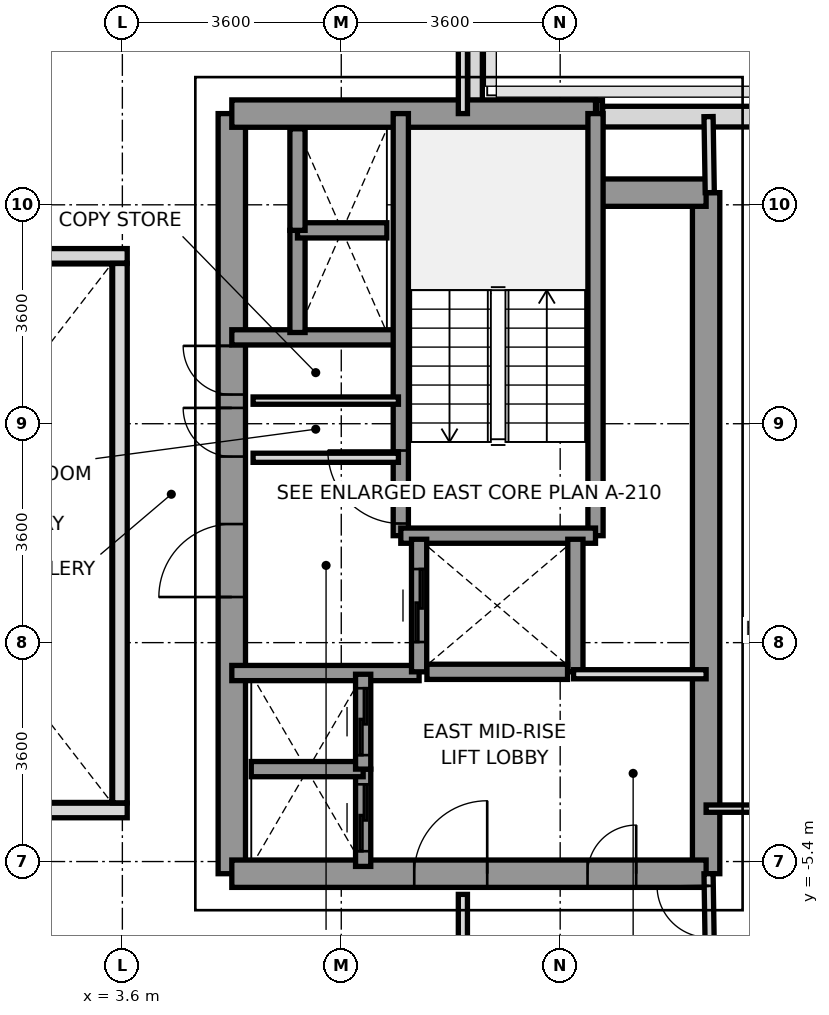
"""IFC4 building model, lengths in metres.
Left out: names, types, materials, properties, quantities, classifications, styles, units other than length and angle.
Written with IfcOpenShell. Run it as: python <this file> out.ifc"""

import sys

from ifc_helpers import new_model, si_unit, direction, frame, frame_2d, origin, place, context, subcontext, project, spatial, rectangle, extrude, source, transform, mapped, element, fill, save


model = new_model("IFC4")
c1 = context("Model", 3, precision=1e-05, world=origin(), true_north=direction((0.0, 1.0)))
c2 = subcontext(c1, "Body", "Model", "MODEL_VIEW")
j1 = project(units=[si_unit("LENGTHUNIT", "METRE"), si_unit("PLANEANGLEUNIT", "RADIAN")], contexts=[c1])
p1 = place(None, origin())
s1 = spatial("IfcSite", under=j1, at=p1, CompositionType="ELEMENT")
p2 = place(p1, origin())
s2 = spatial("IfcBuilding", under=s1, at=p2, CompositionType="ELEMENT")
p3 = place(p2, frame((0.0, 0.0, 127.8)))
s3 = spatial("IfcBuildingStorey", under=s2, at=p3, CompositionType="ELEMENT", Elevation=127.8)
p4 = place(p3, frame((11.498, 6.85, 0.0), z_axis=(0.0, 0.0, 1.0), x_axis=(1.0, 0.0, 0.0)))
e1 = element("IfcWall", 1, at=p4, inside=s3, PredefinedType="SOLIDWALL", context=c2, shape_type="SweptSolid", body=[
    extrude(rectangle(XDim=2.585, YDim=0.34, at=frame_2d((1.292, 0.0))), origin(), (0.0, 0.0, 1.0), 3.2),
])
p5 = place(p3, frame((9.4, 8.472, 0.0), z_axis=(0.0, 0.0, 1.0), x_axis=(0.0, -1.0, 0.0)))
e2 = element("IfcWall", 2, at=p5, inside=s3, PredefinedType="PARAPET", context=c2, shape_type="SweptSolid", body=[
    extrude(rectangle(XDim=1.519, YDim=0.24, at=frame_2d((0.76, 0.0))), origin(), (0.0, 0.0, 1.0), 1.15),
])
p6 = place(p3, frame((11.403, 7.0, 0.0), z_axis=(0.0, 0.0, 1.0), x_axis=(1.0, 0.0, 0.0)))
e3 = element("IfcWall", 3, at=p6, inside=s3, PredefinedType="PARAPET", context=c2, shape_type="SweptSolid", body=[
    extrude(rectangle(XDim=0.092, YDim=0.24, at=frame_2d((0.046, 0.0))), origin(), (0.0, 0.0, 1.0), 1.15),
])
p7 = place(p3, frame((13.2, -5.6, 0.0), z_axis=(0.0, 0.0, 1.0), x_axis=(0.0, 1.0, 0.0)))
e4 = element("IfcWall", 4, at=p7, inside=s3, PredefinedType="SHEAR", context=c2, shape_type="SweptSolid", body=[
    extrude(rectangle(XDim=11.2, YDim=0.45, at=frame_2d((5.6, 0.0))), origin(), (0.0, 0.0, 1.0), 3.2),
])
p8 = place(p3, frame((5.4, -5.6, 0.0), z_axis=(0.0, 0.0, 1.0), x_axis=(0.0, 1.0, 0.0)))
e5 = element("IfcWall", 5, at=p8, inside=s3, PredefinedType="SHEAR", context=c2, shape_type="SweptSolid", body=[
    extrude(rectangle(XDim=12.5, YDim=0.45, at=frame_2d((6.25, 0.0))), origin(), (0.0, 0.0, 1.0), 3.2),
])
p9 = place(p8, frame((4.55, 0.0, 0.0)))
e6 = element("IfcOpeningElement", 6, at=p9, cuts=e5, PredefinedType="OPENING", context=c2, shape_type="SweptSolid", body=[
    extrude(rectangle(XDim=1.2, YDim=2.2, at=frame_2d((0.6, 1.1))), frame((0.0, 0.235, 0.0), z_axis=(0.0, -1.0, 0.0), x_axis=(1.0, 0.0, 0.0)), (0.0, 0.0, 1.0), 0.47),
])
p10 = place(p8, frame((6.86, 0.0, 0.0)))
e7 = element("IfcOpeningElement", 7, at=p10, cuts=e5, PredefinedType="OPENING", context=c2, shape_type="SweptSolid", body=[
    extrude(rectangle(XDim=0.8, YDim=2.1, at=frame_2d((0.4, 1.05))), frame((0.0, 0.235, 0.0), z_axis=(0.0, -1.0, 0.0), x_axis=(1.0, 0.0, 0.0)), (0.0, 0.0, 1.0), 0.47),
])
p11 = place(p8, frame((7.88, 0.0, 0.0)))
e8 = element("IfcOpeningElement", 8, at=p11, cuts=e5, PredefinedType="OPENING", context=c2, shape_type="SweptSolid", body=[
    extrude(rectangle(XDim=0.8, YDim=2.1, at=frame_2d((0.4, 1.05))), frame((0.0, 0.235, 0.0), z_axis=(0.0, -1.0, 0.0), x_axis=(1.0, 0.0, 0.0)), (0.0, 0.0, 1.0), 0.47),
])
p12 = place(p3, frame((5.4, 6.9, 0.0), z_axis=(0.0, 0.0, 1.0), x_axis=(1.0, 0.0, 0.0)))
e9 = element("IfcWall", 9, at=p12, inside=s3, PredefinedType="SHEAR", context=c2, shape_type="SweptSolid", body=[
    extrude(rectangle(XDim=5.981, YDim=0.45, at=frame_2d((2.991, 0.0))), origin(), (0.0, 0.0, 1.0), 3.2),
])
p13 = place(p3, frame((11.381, 5.6, 0.0), z_axis=(0.0, 0.0, 1.0), x_axis=(1.0, 0.0, 0.0)))
e10 = element("IfcWall", 10, at=p13, inside=s3, PredefinedType="SHEAR", context=c2, shape_type="SweptSolid", body=[
    extrude(rectangle(XDim=1.819, YDim=0.45, at=frame_2d((0.909, 0.0))), origin(), (0.0, 0.0, 1.0), 3.2),
])
p14 = place(p3, frame((5.4, -5.6, 0.0), z_axis=(0.0, 0.0, 1.0), x_axis=(1.0, 0.0, 0.0)))
e11 = element("IfcWall", 11, at=p14, inside=s3, PredefinedType="SHEAR", context=c2, shape_type="SweptSolid", body=[
    extrude(rectangle(XDim=7.8, YDim=0.45, at=frame_2d((3.9, 0.0))), origin(), (0.0, 0.0, 1.0), 3.2),
])
p15 = place(p14, frame((3.0, 0.0, 0.0)))
e12 = element("IfcOpeningElement", 12, at=p15, cuts=e11, PredefinedType="OPENING", context=c2, shape_type="SweptSolid", body=[
    extrude(rectangle(XDim=1.2, YDim=2.2, at=frame_2d((0.6, 1.1))), frame((0.0, 0.235, 0.0), z_axis=(0.0, -1.0, 0.0), x_axis=(1.0, 0.0, 0.0)), (0.0, 0.0, 1.0), 0.47),
])
p16 = place(p14, frame((5.85, 0.0, 0.0)))
e13 = element("IfcOpeningElement", 13, at=p16, cuts=e11, PredefinedType="OPENING", context=c2, shape_type="SweptSolid", body=[
    extrude(rectangle(XDim=0.8, YDim=2.1, at=frame_2d((0.4, 1.05))), frame((0.0, 0.235, 0.0), z_axis=(0.0, -1.0, 0.0), x_axis=(1.0, 0.0, 0.0)), (0.0, 0.0, 1.0), 0.47),
])
p17 = place(p3, frame((5.4, 3.22, 0.0), z_axis=(0.0, 0.0, 1.0), x_axis=(1.0, 0.0, 0.0)))
e14 = element("IfcWall", 14, at=p17, inside=s3, PredefinedType="SOLIDWALL", context=c2, shape_type="SweptSolid", body=[
    extrude(rectangle(XDim=2.78, YDim=0.25, at=frame_2d((1.39, 0.0))), origin(), (0.0, 0.0, 1.0), 3.2),
])
p18 = place(p3, frame((5.4, -2.3, 0.0), z_axis=(0.0, 0.0, 1.0), x_axis=(1.0, 0.0, 0.0)))
e15 = element("IfcWall", 15, at=p18, inside=s3, PredefinedType="SOLIDWALL", context=c2, shape_type="SweptSolid", body=[
    extrude(rectangle(XDim=3.08, YDim=0.25, at=frame_2d((1.54, 0.0))), origin(), (0.0, 0.0, 1.0), 3.2),
])
p19 = place(p3, frame((8.179, -0.041, 0.0), z_axis=(0.0, 0.0, 1.0), x_axis=(0.0, 1.0, 0.0)))
e16 = element("IfcWall", 16, at=p19, inside=s3, PredefinedType="SOLIDWALL", context=c2, shape_type="SweptSolid", body=[
    extrude(rectangle(XDim=6.941, YDim=0.25, at=frame_2d((3.47, 0.0))), origin(), (0.0, 0.0, 1.0), 3.2),
])
p20 = place(p19, frame((0.2, 0.0, 0.0)))
e17 = element("IfcOpeningElement", 17, at=p20, cuts=e16, PredefinedType="OPENING", context=c2, shape_type="SweptSolid", body=[
    extrude(rectangle(XDim=1.2, YDim=2.2, at=frame_2d((0.6, 1.1))), frame((0.0, 0.135, 0.0), z_axis=(0.0, -1.0, 0.0), x_axis=(1.0, 0.0, 0.0)), (0.0, 0.0, 1.0), 0.27),
])
p21 = place(p3, frame((11.381, -0.041, 0.0), z_axis=(0.0, 0.0, 1.0), x_axis=(0.0, 1.0, 0.0)))
e18 = element("IfcWall", 18, at=p21, inside=s3, PredefinedType="SOLIDWALL", context=c2, shape_type="SweptSolid", body=[
    extrude(rectangle(XDim=6.941, YDim=0.25, at=frame_2d((3.47, 0.0))), origin(), (0.0, 0.0, 1.0), 3.2),
])
p22 = place(p3, frame((8.179, -0.041, 0.0), z_axis=(0.0, 0.0, 1.0), x_axis=(1.0, 0.0, 0.0)))
e19 = element("IfcWall", 19, at=p22, inside=s3, PredefinedType="SOLIDWALL", context=c2, shape_type="SweptSolid", body=[
    extrude(rectangle(XDim=3.202, YDim=0.25, at=frame_2d((1.601, 0.0))), origin(), (0.0, 0.0, 1.0), 3.2),
])
p23 = place(p3, frame((8.48, -2.28, 0.0), z_axis=(0.0, 0.0, 1.0), x_axis=(0.0, 1.0, 0.0)))
e20 = element("IfcWall", 20, at=p23, inside=s3, PredefinedType="SOLIDWALL", context=c2, shape_type="SweptSolid", body=[
    extrude(rectangle(XDim=2.18, YDim=0.25, at=frame_2d((1.09, 0.0))), origin(), (0.0, 0.0, 1.0), 3.2),
])
p24 = place(p23, frame((0.49, 0.0, 0.0)))
e21 = element("IfcOpeningElement", 21, at=p24, cuts=e20, PredefinedType="OPENING", context=c2, shape_type="SweptSolid", body=[
    extrude(rectangle(XDim=1.2, YDim=2.2, at=frame_2d((0.6, 1.1))), frame((0.0, 0.135, 0.0), z_axis=(0.0, -1.0, 0.0), x_axis=(1.0, 0.0, 0.0)), (0.0, 0.0, 1.0), 0.27),
])
p25 = place(p3, frame((11.05, -2.28, 0.0), z_axis=(0.0, 0.0, 1.0), x_axis=(0.0, 1.0, 0.0)))
e22 = element("IfcWall", 22, at=p25, inside=s3, PredefinedType="SOLIDWALL", context=c2, shape_type="SweptSolid", body=[
    extrude(rectangle(XDim=2.18, YDim=0.25, at=frame_2d((1.09, 0.0))), origin(), (0.0, 0.0, 1.0), 3.2),
])
p26 = place(p3, frame((8.609, -2.28, 0.0), z_axis=(0.0, 0.0, 1.0), x_axis=(1.0, 0.0, 0.0)))
e23 = element("IfcWall", 23, at=p26, inside=s3, PredefinedType="SOLIDWALL", context=c2, shape_type="SweptSolid", body=[
    extrude(rectangle(XDim=2.312, YDim=0.25, at=frame_2d((1.156, 0.0))), origin(), (0.0, 0.0, 1.0), 3.2),
])
p27 = place(p3, frame((7.56, -5.48, 0.0), z_axis=(0.0, 0.0, 1.0), x_axis=(0.0, 1.0, 0.0)))
e24 = element("IfcWall", 24, at=p27, inside=s3, PredefinedType="SOLIDWALL", context=c2, shape_type="SweptSolid", body=[
    extrude(rectangle(XDim=1.6, YDim=0.25, at=frame_2d((0.8, 0.0))), origin(), (0.0, 0.0, 1.0), 3.2),
])
p28 = place(p27, frame((0.25, 0.0, 0.0)))
e25 = element("IfcOpeningElement", 25, at=p28, cuts=e24, PredefinedType="OPENING", context=c2, shape_type="SweptSolid", body=[
    extrude(rectangle(XDim=1.1, YDim=2.2, at=frame_2d((0.55, 1.1))), frame((0.0, 0.135, 0.0), z_axis=(0.0, -1.0, 0.0), x_axis=(1.0, 0.0, 0.0)), (0.0, 0.0, 1.0), 0.27),
])
p29 = place(p3, frame((5.72, -3.88, 0.0), z_axis=(0.0, 0.0, 1.0), x_axis=(1.0, 0.0, 0.0)))
e26 = element("IfcWall", 26, at=p29, inside=s3, PredefinedType="SOLIDWALL", context=c2, shape_type="SweptSolid", body=[
    extrude(rectangle(XDim=1.84, YDim=0.25, at=frame_2d((0.92, 0.0))), origin(), (0.0, 0.0, 1.0), 3.2),
])
p30 = place(p3, frame((7.56, -3.88, 0.0), z_axis=(0.0, 0.0, 1.0), x_axis=(0.0, 1.0, 0.0)))
e27 = element("IfcWall", 27, at=p30, inside=s3, PredefinedType="SOLIDWALL", context=c2, shape_type="SweptSolid", body=[
    extrude(rectangle(XDim=1.56, YDim=0.25, at=frame_2d((0.78, 0.0))), origin(), (0.0, 0.0, 1.0), 3.2),
])
p31 = place(p30, frame((0.23, 0.0, 0.0)))
e28 = element("IfcOpeningElement", 28, at=p31, cuts=e27, PredefinedType="OPENING", context=c2, shape_type="SweptSolid", body=[
    extrude(rectangle(XDim=1.1, YDim=2.2, at=frame_2d((0.55, 1.1))), frame((0.0, 0.135, 0.0), z_axis=(0.0, -1.0, 0.0), x_axis=(1.0, 0.0, 0.0)), (0.0, 0.0, 1.0), 0.27),
])
p32 = place(p3, frame((6.48, 3.3, 0.0), z_axis=(0.0, 0.0, 1.0), x_axis=(0.0, 1.0, 0.0)))
e29 = element("IfcWall", 29, at=p32, inside=s3, PredefinedType="SOLIDWALL", context=c2, shape_type="SweptSolid", body=[
    extrude(rectangle(XDim=1.68, YDim=0.25, at=frame_2d((0.84, 0.0))), origin(), (0.0, 0.0, 1.0), 3.2),
])
p33 = place(p3, frame((6.48, 4.98, 0.0), z_axis=(0.0, 0.0, 1.0), x_axis=(1.0, 0.0, 0.0)))
e30 = element("IfcWall", 30, at=p33, inside=s3, PredefinedType="SOLIDWALL", context=c2, shape_type="SweptSolid", body=[
    extrude(rectangle(XDim=1.47, YDim=0.25, at=frame_2d((0.735, 0.0))), origin(), (0.0, 0.0, 1.0), 3.2),
])
p34 = place(p3, frame((6.48, 4.98, 0.0), z_axis=(0.0, 0.0, 1.0), x_axis=(0.0, 1.0, 0.0)))
e31 = element("IfcWall", 31, at=p34, inside=s3, PredefinedType="SOLIDWALL", context=c2, shape_type="SweptSolid", body=[
    extrude(rectangle(XDim=1.67, YDim=0.25, at=frame_2d((0.835, 0.0))), origin(), (0.0, 0.0, 1.0), 3.2),
])
p35 = place(p3, frame((5.75, 1.24, 0.0), z_axis=(0.0, 0.0, 1.0), x_axis=(1.0, 0.0, 0.0)))
e32 = element("IfcWall", 32, at=p35, inside=s3, PredefinedType="PARTITIONING", context=c2, shape_type="SweptSolid", body=[
    extrude(rectangle(XDim=2.39, YDim=0.15, at=frame_2d((1.195, 0.0))), origin(), (0.0, 0.0, 1.0), 2.3),
])
p36 = place(p3, frame((5.75, 2.18, 0.0), z_axis=(0.0, 0.0, 1.0), x_axis=(1.0, 0.0, 0.0)))
e33 = element("IfcWall", 33, at=p36, inside=s3, PredefinedType="PARTITIONING", context=c2, shape_type="SweptSolid", body=[
    extrude(rectangle(XDim=2.39, YDim=0.12, at=frame_2d((1.195, 0.0))), origin(), (0.0, 0.0, 1.0), 2.3),
])
p37 = place(p3, frame((11.02, -2.32, 0.0), z_axis=(0.0, 0.0, 1.0), x_axis=(1.0, 0.0, 0.0)))
e34 = element("IfcWall", 34, at=p37, inside=s3, PredefinedType="PARTITIONING", context=c2, shape_type="SweptSolid", body=[
    extrude(rectangle(XDim=2.18, YDim=0.15, at=frame_2d((1.09, 0.0))), origin(), (0.0, 0.0, 1.0), 3.2),
])
p38 = place(p3, frame((9.2, 6.9, 0.0), z_axis=(0.0, 0.0, 1.0), x_axis=(0.0, 1.0, 0.0)))
e35 = element("IfcWall", 35, at=p38, inside=s3, PredefinedType="PARTITIONING", context=c2, shape_type="SweptSolid", body=[
    extrude(rectangle(XDim=8.78, YDim=0.15, at=frame_2d((4.39, 0.0))), origin(), (0.0, 0.0, 1.0), 2.7),
])
p39 = place(p3, frame((9.2, -15.68, 0.0), z_axis=(0.0, 0.0, 1.0), x_axis=(0.0, 1.0, 0.0)))
e36 = element("IfcWall", 36, at=p39, inside=s3, PredefinedType="PARTITIONING", context=c2, shape_type="SweptSolid", body=[
    extrude(rectangle(XDim=9.74, YDim=0.15, at=frame_2d((4.87, 0.0))), origin(), (0.0, 0.0, 1.0), 2.7),
])
p40 = place(p3, frame((13.26, 5.6, 0.0), z_axis=(0.0, 0.0, 1.0), x_axis=(-0.016013571389, 0.999871774545, 0.0)))
e37 = element("IfcWall", 37, at=p40, inside=s3, PredefinedType="PARTITIONING", context=c2, shape_type="SweptSolid", body=[
    extrude(rectangle(XDim=1.25, YDim=0.15, at=frame_2d((0.625, 0.0))), origin(), (0.0, 0.0, 1.0), 3.2),
])
p41 = place(p3, frame((13.26, -6.85, 0.0), z_axis=(0.0, 0.0, 1.0), x_axis=(-0.016013571389, 0.999871774545, 0.0)))
e38 = element("IfcWall", 38, at=p41, inside=s3, PredefinedType="PARTITIONING", context=c2, shape_type="SweptSolid", body=[
    extrude(rectangle(XDim=1.25, YDim=0.15, at=frame_2d((0.625, 0.0))), origin(), (0.0, 0.0, 1.0), 3.2),
])
p42 = place(p41, frame((0.2, 0.0, 0.0)))
e39 = element("IfcOpeningElement", 39, at=p42, cuts=e38, PredefinedType="OPENING", context=c2, shape_type="SweptSolid", body=[
    extrude(rectangle(XDim=0.85, YDim=2.1, at=frame_2d((0.425, 1.05))), frame((0.0, 0.085, 0.0), z_axis=(0.0, -1.0, 0.0), x_axis=(1.0, 0.0, 0.0)), (0.0, 0.0, 1.0), 0.17),
])
p43 = place(p3, frame((13.2, -4.53, 0.0), z_axis=(0.0, 0.0, 1.0), x_axis=(1.0, 0.0, 0.0)))
e40 = element("IfcWall", 40, at=p43, inside=s3, PredefinedType="PARTITIONING", context=c2, shape_type="SweptSolid", body=[
    extrude(rectangle(XDim=10.1, YDim=0.12, at=frame_2d((5.05, 0.0))), origin(), (0.0, 0.0, 1.0), 2.75),
])
p44 = place(p43, frame((7.75, 0.0, 0.0)))
e41 = element("IfcOpeningElement", 41, at=p44, cuts=e40, PredefinedType="OPENING", context=c2, shape_type="SweptSolid", body=[
    extrude(rectangle(XDim=0.95, YDim=2.15, at=frame_2d((0.475, 1.075))), frame((0.0, 0.07, 0.0), z_axis=(0.0, -1.0, 0.0), x_axis=(1.0, 0.0, 0.0)), (0.0, 0.0, 1.0), 0.14),
])
for number, where, z_axis, x_axis in (
    (42, (-3.68, -4.56, 0.0), (0.0, 0.0, 1.0), (1.0, 0.0, 0.0)),
    (43, (-3.68, 4.56, 0.0), (0.0, 0.0, 1.0), (1.0, 0.0, 0.0)),
):
    element("IfcWall", number, at=place(p3, frame(where, z_axis=z_axis, x_axis=x_axis)), inside=s3, PredefinedType="PARAPET", context=c2, shape_type="SweptSolid", body=[
        extrude(rectangle(XDim=7.36, YDim=0.24, at=frame_2d((3.68, 0.0))), origin(), (0.0, 0.0, 1.0), 1.15),
    ])
p45 = place(p3, frame((3.56, -4.435, 0.0), z_axis=(0.0, 0.0, 1.0), x_axis=(0.0, 1.0, 0.0)))
e44 = element("IfcWall", 44, at=p45, inside=s3, PredefinedType="PARAPET", context=c2, shape_type="SweptSolid", body=[
    extrude(rectangle(XDim=8.87, YDim=0.24, at=frame_2d((4.435, 0.0))), origin(), (0.0, 0.0, 1.0), 1.15),
])
m1 = source(origin(), c2, "Body", "SweptSolid", [
    extrude(rectangle(XDim=1.2, YDim=2.2, at=frame_2d((0.6, 1.1))), frame((0.0, 0.025, 0.0), z_axis=(0.0, -1.0, 0.0), x_axis=(1.0, 0.0, 0.0)), (0.0, 0.0, 1.0), 0.05),
])
p46 = place(p20, origin())
e45 = element("IfcDoor", 45, at=p46, inside=s3, OperationType="SINGLE_SWING_RIGHT", PredefinedType="DOOR", context=c2, shape_type="MappedRepresentation", body=[
    mapped(m1, transform((0.0, 0.0, 0.0), x_axis=(1.0, 0.0, 0.0), y_axis=(0.0, 1.0, 0.0), z_axis=(0.0, 0.0, 1.0), scale=1.0)),
])
fill(e17, e45)
p47 = place(p9, origin())
e46 = element("IfcDoor", 46, at=p47, inside=s3, OperationType="SINGLE_SWING_LEFT", PredefinedType="DOOR", context=c2, shape_type="MappedRepresentation", body=[
    mapped(m1, transform((0.0, 0.0, 0.0), x_axis=(1.0, 0.0, 0.0), y_axis=(0.0, 1.0, 0.0), z_axis=(0.0, 0.0, 1.0), scale=1.0)),
])
fill(e6, e46)
p48 = place(p15, origin())
e47 = element("IfcDoor", 47, at=p48, inside=s3, OperationType="SINGLE_SWING_RIGHT", PredefinedType="DOOR", context=c2, shape_type="MappedRepresentation", body=[
    mapped(m1, transform((0.0, 0.0, 0.0), x_axis=(1.0, 0.0, 0.0), y_axis=(0.0, 1.0, 0.0), z_axis=(0.0, 0.0, 1.0), scale=1.0)),
])
fill(e12, e47)
m2 = source(origin(), c2, "Body", "SweptSolid", [
    extrude(rectangle(XDim=0.8, YDim=2.1, at=frame_2d((0.4, 1.05))), frame((0.0, 0.025, 0.0), z_axis=(0.0, -1.0, 0.0), x_axis=(1.0, 0.0, 0.0)), (0.0, 0.0, 1.0), 0.05),
])
p49 = place(p10, origin())
e48 = element("IfcDoor", 48, at=p49, inside=s3, OperationType="SINGLE_SWING_RIGHT", PredefinedType="DOOR", context=c2, shape_type="MappedRepresentation", body=[
    mapped(m2, transform((0.0, 0.0, 0.0), x_axis=(1.0, 0.0, 0.0), y_axis=(0.0, 1.0, 0.0), z_axis=(0.0, 0.0, 1.0), scale=1.0)),
])
fill(e7, e48)
p50 = place(p11, origin())
e49 = element("IfcDoor", 49, at=p50, inside=s3, OperationType="SINGLE_SWING_RIGHT", PredefinedType="DOOR", context=c2, shape_type="MappedRepresentation", body=[
    mapped(m2, transform((0.0, 0.0, 0.0), x_axis=(1.0, 0.0, 0.0), y_axis=(0.0, 1.0, 0.0), z_axis=(0.0, 0.0, 1.0), scale=1.0)),
])
fill(e8, e49)
p51 = place(p16, origin())
e50 = element("IfcDoor", 50, at=p51, inside=s3, OperationType="SINGLE_SWING_RIGHT", PredefinedType="DOOR", context=c2, shape_type="MappedRepresentation", body=[
    mapped(m2, transform((0.0, 0.0, 0.0), x_axis=(1.0, 0.0, 0.0), y_axis=(0.0, 1.0, 0.0), z_axis=(0.0, 0.0, 1.0), scale=1.0)),
])
fill(e13, e50)
p52 = place(p24, origin())
e51 = element("IfcDoor", 51, at=p52, inside=s3, OperationType="SLIDING_TO_RIGHT", PredefinedType="DOOR", context=c2, shape_type="MappedRepresentation", body=[
    mapped(m1, transform((0.0, 0.0, 0.0), x_axis=(1.0, 0.0, 0.0), y_axis=(0.0, 1.0, 0.0), z_axis=(0.0, 0.0, 1.0), scale=1.0)),
])
fill(e21, e51)
m3 = source(origin(), c2, "Body", "SweptSolid", [
    extrude(rectangle(XDim=1.1, YDim=2.2, at=frame_2d((0.55, 1.1))), frame((0.0, 0.025, 0.0), z_axis=(0.0, -1.0, 0.0), x_axis=(1.0, 0.0, 0.0)), (0.0, 0.0, 1.0), 0.05),
])
p53 = place(p28, origin())
e52 = element("IfcDoor", 52, at=p53, inside=s3, OperationType="SLIDING_TO_LEFT", PredefinedType="DOOR", context=c2, shape_type="MappedRepresentation", body=[
    mapped(m3, transform((0.0, 0.0, 0.0), x_axis=(1.0, 0.0, 0.0), y_axis=(0.0, 1.0, 0.0), z_axis=(0.0, 0.0, 1.0), scale=1.0)),
])
fill(e25, e52)
p54 = place(p31, origin())
e53 = element("IfcDoor", 53, at=p54, inside=s3, OperationType="SLIDING_TO_LEFT", PredefinedType="DOOR", context=c2, shape_type="MappedRepresentation", body=[
    mapped(m3, transform((0.0, 0.0, 0.0), x_axis=(1.0, 0.0, 0.0), y_axis=(0.0, 1.0, 0.0), z_axis=(0.0, 0.0, 1.0), scale=1.0)),
])
fill(e28, e53)
m4 = source(origin(), c2, "Body", "SweptSolid", [
    extrude(rectangle(XDim=0.85, YDim=2.1, at=frame_2d((0.425, 1.05))), frame((0.0, 0.025, 0.0), z_axis=(0.0, -1.0, 0.0), x_axis=(1.0, 0.0, 0.0)), (0.0, 0.0, 1.0), 0.05),
])
p55 = place(p42, origin())
e54 = element("IfcDoor", 54, at=p55, inside=s3, OperationType="SINGLE_SWING_RIGHT", PredefinedType="DOOR", context=c2, shape_type="MappedRepresentation", body=[
    mapped(m4, transform((0.0, 0.0, 0.0), x_axis=(1.0, 0.0, 0.0), y_axis=(0.0, 1.0, 0.0), z_axis=(0.0, 0.0, 1.0), scale=1.0)),
])
fill(e39, e54)
save(model, sys.argv[1])
